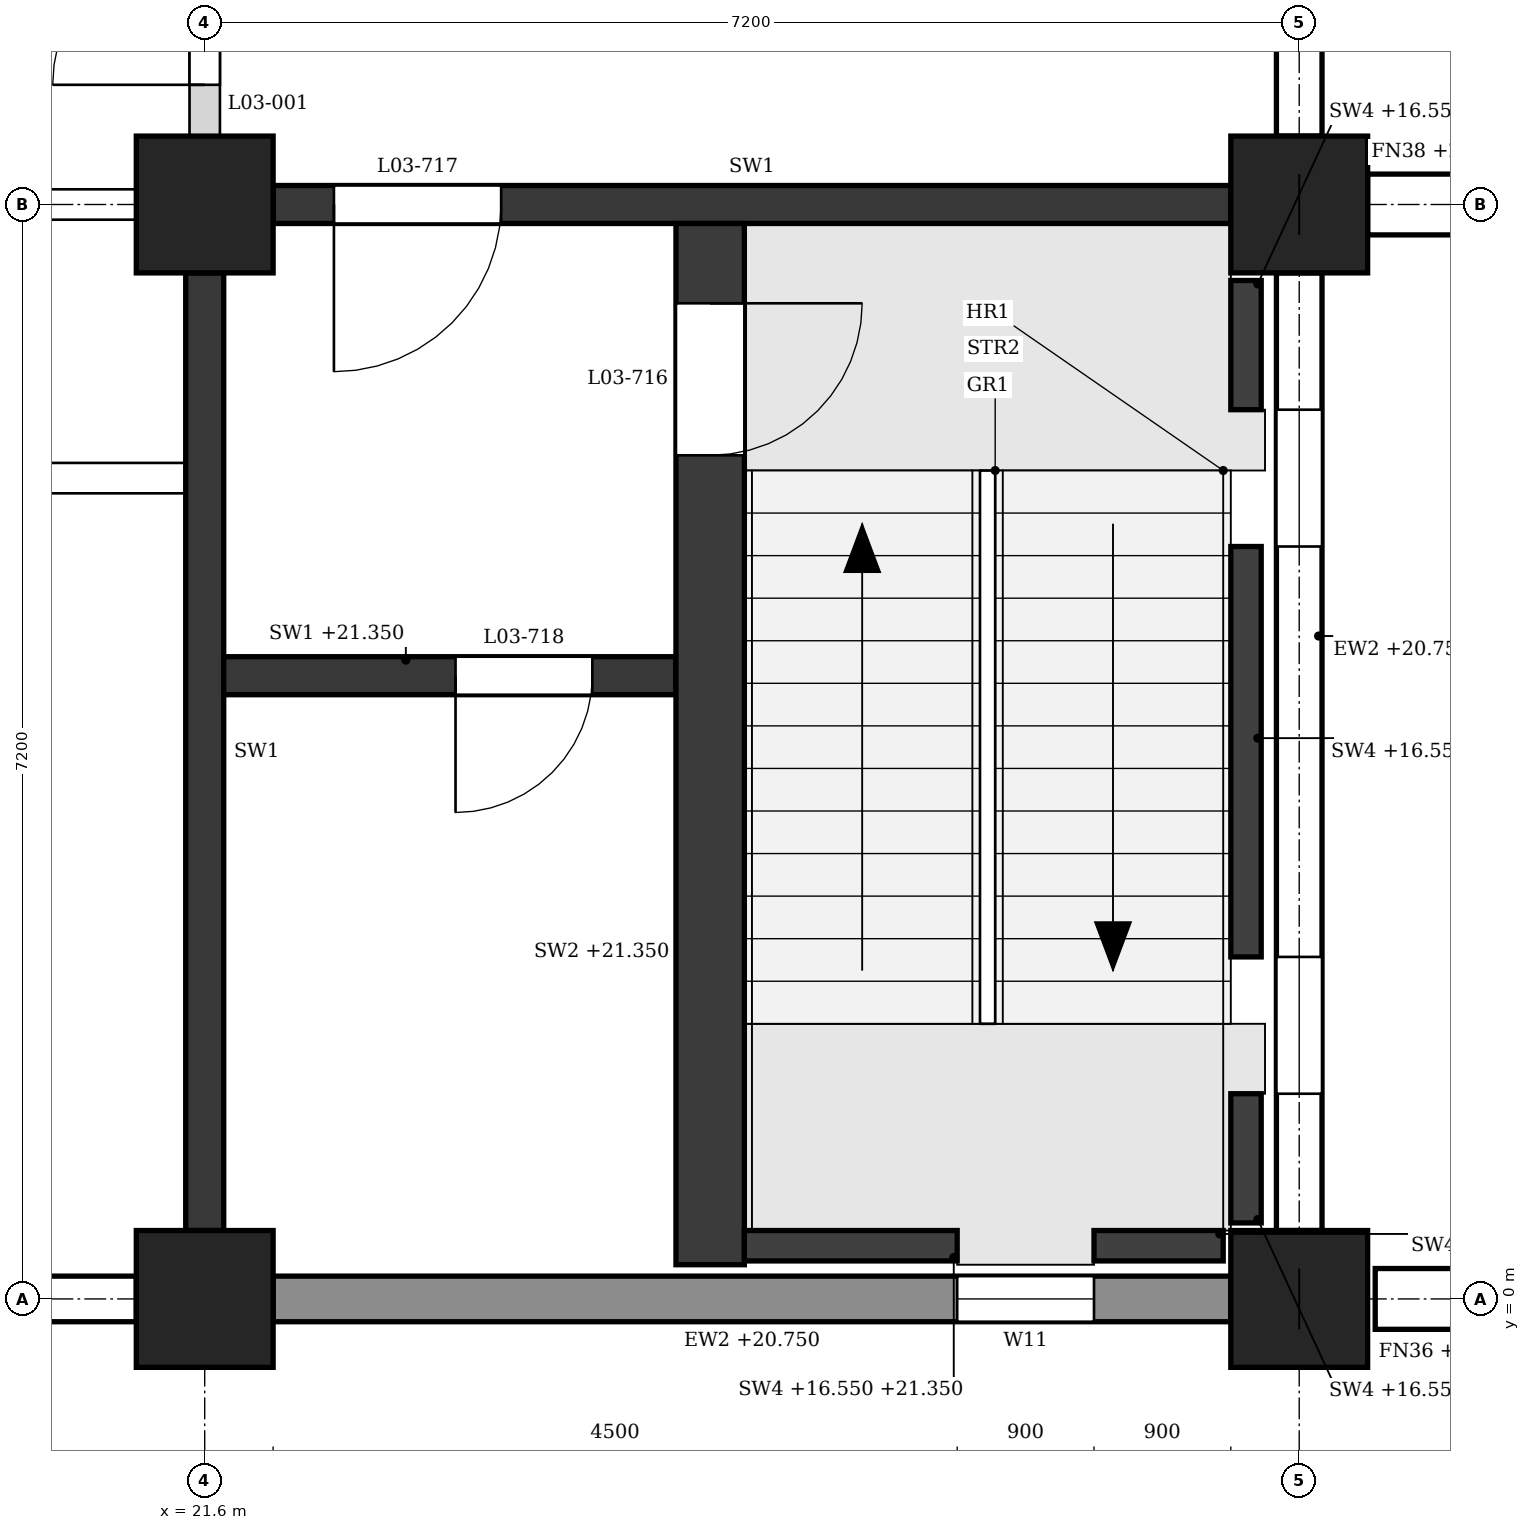
"""IFC4 building model, lengths in metres.
Left out: names, types, materials, properties, quantities, classifications, styles, units other than length and angle.
Written with IfcOpenShell. Run it as: python <this file> out.ifc"""

import sys

from ifc_helpers import new_model, si_unit, direction, frame, frame_2d, origin, origin_2d, place, context, subcontext, project, spatial, polyline, rectangle, outline, extrude, element, fill, save


model = new_model("IFC4")
c1 = context("Model", 3, precision=1e-05, world=origin(), true_north=direction((0.0, 1.0)))
c2 = subcontext(c1, "Body", "Model", "MODEL_VIEW")
j1 = project(units=[si_unit("LENGTHUNIT", "METRE"), si_unit("PLANEANGLEUNIT", "RADIAN")], contexts=[c1])
p1 = place(None, origin())
s1 = spatial("IfcSite", under=j1, at=p1, CompositionType="ELEMENT")
p2 = place(p1, origin())
s2 = spatial("IfcBuilding", under=s1, at=p2, CompositionType="ELEMENT")
p3 = place(p2, frame((0.0, 0.0, 16.8)))
s3 = spatial("IfcBuildingStorey", under=s2, at=p3, CompositionType="ELEMENT", Elevation=16.8)
for number, where, z_axis, x_axis in (
    (1, (21.6, 0.0, 0.0), (0.0, 0.0, 1.0), (1.0, 0.0, 0.0)),
    (2, (21.6, 7.2, 0.0), (0.0, 0.0, 1.0), (1.0, 0.0, 0.0)),
    (3, (28.8, 0.0, 0.0), (0.0, 0.0, 1.0), (1.0, 0.0, 0.0)),
    (4, (28.8, 7.2, 0.0), (0.0, 0.0, 1.0), (1.0, 0.0, 0.0)),
):
    element("IfcColumn", number, at=place(p3, frame(where, z_axis=z_axis, x_axis=x_axis)), inside=s3, PredefinedType="COLUMN", context=c2, shape_type="SweptSolid", body=[
        extrude(rectangle(XDim=0.9, YDim=0.9, at=origin_2d()), origin(), (0.0, 0.0, 1.0), 4.8),
    ])
p4 = place(p3, frame((14.85, 0.0, 0.0), z_axis=(0.0, 0.0, 1.0), x_axis=(1.0, 0.0, 0.0)))
e5 = element("IfcWall", 5, at=p4, inside=s3, PredefinedType="STANDARD", context=c2, shape_type="SweptSolid", body=[
    extrude(rectangle(XDim=6.3, YDim=0.3, at=frame_2d((3.15, 0.0))), origin(), (0.0, 0.0, 1.0), 3.95),
])
p5 = place(p4, frame((0.6, 0.0, 0.9)))
e6 = element("IfcOpeningElement", 6, at=p5, cuts=e5, PredefinedType="OPENING", context=c2, shape_type="SweptSolid", body=[
    extrude(outline(polyline([(0.0, 0.0), (1.5, 0.0), (1.5, 1.75), (0.75, 2.5), (0.0, 1.75), (0.0, 0.0)])), frame((0.0, 0.16, 0.0), z_axis=(0.0, -1.0, 0.0), x_axis=(1.0, 0.0, 0.0)), (0.0, 0.0, 1.0), 0.32),
])
p6 = place(p4, frame((4.2, 0.0, 0.9)))
e7 = element("IfcOpeningElement", 7, at=p6, cuts=e5, PredefinedType="OPENING", context=c2, shape_type="SweptSolid", body=[
    extrude(outline(polyline([(0.0, 0.0), (1.5, 0.0), (1.5, 1.75), (0.75, 2.5), (0.0, 1.75), (0.0, 0.0)])), frame((0.0, 0.16, 0.0), z_axis=(0.0, -1.0, 0.0), x_axis=(1.0, 0.0, 0.0)), (0.0, 0.0, 1.0), 0.32),
])
p7 = place(p3, frame((22.05, 0.0, 0.0), z_axis=(0.0, 0.0, 1.0), x_axis=(1.0, 0.0, 0.0)))
e8 = element("IfcWall", 8, at=p7, inside=s3, PredefinedType="STANDARD", context=c2, shape_type="SweptSolid", body=[
    extrude(rectangle(XDim=6.3, YDim=0.3, at=frame_2d((3.15, 0.0))), origin(), (0.0, 0.0, 1.0), 3.95),
])
p8 = place(p7, frame((4.5, 0.0, 0.9)))
e9 = element("IfcOpeningElement", 9, at=p8, cuts=e8, PredefinedType="OPENING", context=c2, shape_type="SweptSolid", body=[
    extrude(outline(polyline([(0.0, 0.0), (0.9, 0.0), (0.9, 2.05), (0.45, 2.5), (0.0, 2.05), (0.0, 0.0)])), frame((0.0, 0.16, 0.0), z_axis=(0.0, -1.0, 0.0), x_axis=(1.0, 0.0, 0.0)), (0.0, 0.0, 1.0), 0.32),
])
p9 = place(p3, frame((28.8, 0.45, 0.0), z_axis=(0.0, 0.0, 1.0), x_axis=(0.0, 1.0, 0.0)))
e10 = element("IfcWall", 10, at=p9, inside=s3, PredefinedType="STANDARD", context=c2, shape_type="SweptSolid", body=[
    extrude(rectangle(XDim=6.3, YDim=0.3, at=frame_2d((3.15, 0.0))), origin(), (0.0, 0.0, 1.0), 3.95),
])
p10 = place(p9, frame((0.9, 0.0, 0.9)))
e11 = element("IfcOpeningElement", 11, at=p10, cuts=e10, PredefinedType="OPENING", context=c2, shape_type="SweptSolid", body=[
    extrude(outline(polyline([(0.0, 0.0), (0.9, 0.0), (0.9, 2.05), (0.45, 2.5), (0.0, 2.05), (0.0, 0.0)])), frame((0.0, 0.16, 0.0), z_axis=(0.0, -1.0, 0.0), x_axis=(1.0, 0.0, 0.0)), (0.0, 0.0, 1.0), 0.32),
])
p11 = place(p9, frame((4.5, 0.0, 0.9)))
e12 = element("IfcOpeningElement", 12, at=p11, cuts=e10, PredefinedType="OPENING", context=c2, shape_type="SweptSolid", body=[
    extrude(outline(polyline([(0.0, 0.0), (0.9, 0.0), (0.9, 2.05), (0.45, 2.5), (0.0, 2.05), (0.0, 0.0)])), frame((0.0, 0.16, 0.0), z_axis=(0.0, -1.0, 0.0), x_axis=(1.0, 0.0, 0.0)), (0.0, 0.0, 1.0), 0.32),
])
p12 = place(p3, frame((28.8, 7.65, 0.0), z_axis=(0.0, 0.0, 1.0), x_axis=(0.0, 1.0, 0.0)))
e13 = element("IfcWall", 13, at=p12, inside=s3, PredefinedType="STANDARD", context=c2, shape_type="SweptSolid", body=[
    extrude(rectangle(XDim=6.3, YDim=0.3, at=frame_2d((3.15, 0.0))), origin(), (0.0, 0.0, 1.0), 3.95),
])
p13 = place(p12, frame((0.6, 0.0, 0.9)))
e14 = element("IfcOpeningElement", 14, at=p13, cuts=e13, PredefinedType="OPENING", context=c2, shape_type="SweptSolid", body=[
    extrude(outline(polyline([(0.0, 0.0), (1.5, 0.0), (1.5, 1.75), (0.75, 2.5), (0.0, 1.75), (0.0, 0.0)])), frame((0.0, 0.16, 0.0), z_axis=(0.0, -1.0, 0.0), x_axis=(1.0, 0.0, 0.0)), (0.0, 0.0, 1.0), 0.32),
])
for number, where, z_axis, x_axis in (
    (15, (29.3, 0.0, 0.0), (0.0, 0.0, 1.0), (1.0, 0.0, 0.0)),
    (16, (29.25, 7.2, 0.0), (0.0, 0.0, 1.0), (1.0, 0.0, 0.0)),
):
    element("IfcWall", number, at=place(p3, frame(where, z_axis=z_axis, x_axis=x_axis)), inside=s3, PredefinedType="POLYGONAL", context=c2, shape_type="SweptSolid", body=[
        extrude(outline(polyline([(0.6, 0.0), (0.6, 4.55), (0.0, 4.55), (0.0, 0.0), (0.6, 0.0)])), frame((0.0, 0.2, 0.0), z_axis=(0.0, -1.0, 0.0), x_axis=(1.0, 0.0, 0.0)), (0.0, 0.0, 1.0), 0.4),
    ])
p14 = place(p3, frame((22.05, 7.2, 0.0), z_axis=(0.0, 0.0, 1.0), x_axis=(1.0, 0.0, 0.0)))
e17 = element("IfcWall", 17, at=p14, inside=s3, PredefinedType="SHEAR", context=c2, shape_type="SweptSolid", body=[
    extrude(rectangle(XDim=6.3, YDim=0.25, at=frame_2d((3.15, 0.0))), origin(), (0.0, 0.0, 1.0), 3.8),
])
p15 = place(p14, frame((0.4, 0.0, 0.0)))
e18 = element("IfcOpeningElement", 18, at=p15, cuts=e17, PredefinedType="OPENING", context=c2, shape_type="SweptSolid", body=[
    extrude(rectangle(XDim=1.1, YDim=2.1, at=frame_2d((0.55, 1.05))), frame((0.0, 0.135, 0.0), z_axis=(0.0, -1.0, 0.0), x_axis=(1.0, 0.0, 0.0)), (0.0, 0.0, 1.0), 0.27),
])
p16 = place(p3, frame((21.6, 0.45, 0.0), z_axis=(0.0, 0.0, 1.0), x_axis=(0.0, 1.0, 0.0)))
e19 = element("IfcWall", 19, at=p16, inside=s3, PredefinedType="SHEAR", context=c2, shape_type="SweptSolid", body=[
    extrude(rectangle(XDim=6.3, YDim=0.25, at=frame_2d((3.15, 0.0))), origin(), (0.0, 0.0, 1.0), 3.8),
])
p17 = place(p3, frame((28.45, 0.5, -0.25), z_axis=(0.0, 0.0, 1.0), x_axis=(0.0, 1.0, 0.0)))
e20 = element("IfcWall", 20, at=p17, inside=s3, PredefinedType="SHEAR", context=c2, shape_type="SweptSolid", body=[
    extrude(rectangle(XDim=0.85, YDim=0.2, at=frame_2d((0.425, 0.0))), origin(), (0.0, 0.0, 1.0), 4.8),
])
p18 = place(p3, frame((28.45, 2.25, -0.25), z_axis=(0.0, 0.0, 1.0), x_axis=(0.0, 1.0, 0.0)))
e21 = element("IfcWall", 21, at=p18, inside=s3, PredefinedType="SHEAR", context=c2, shape_type="SweptSolid", body=[
    extrude(rectangle(XDim=2.7, YDim=0.2, at=frame_2d((1.35, 0.0))), origin(), (0.0, 0.0, 1.0), 4.8),
])
p19 = place(p3, frame((28.45, 5.85, -0.25), z_axis=(0.0, 0.0, 1.0), x_axis=(0.0, 1.0, 0.0)))
e22 = element("IfcWall", 22, at=p19, inside=s3, PredefinedType="SHEAR", context=c2, shape_type="SweptSolid", body=[
    extrude(rectangle(XDim=0.85, YDim=0.2, at=frame_2d((0.425, 0.0))), origin(), (0.0, 0.0, 1.0), 4.8),
])
p20 = place(p3, frame((25.15, 0.35, -0.25), z_axis=(0.0, 0.0, 1.0), x_axis=(1.0, 0.0, 0.0)))
e23 = element("IfcWall", 23, at=p20, inside=s3, PredefinedType="SHEAR", context=c2, shape_type="SweptSolid", body=[
    extrude(rectangle(XDim=1.4, YDim=0.2, at=frame_2d((0.7, 0.0))), origin(), (0.0, 0.0, 1.0), 4.8),
])
p21 = place(p3, frame((27.45, 0.35, -0.25), z_axis=(0.0, 0.0, 1.0), x_axis=(1.0, 0.0, 0.0)))
e24 = element("IfcWall", 24, at=p21, inside=s3, PredefinedType="SHEAR", context=c2, shape_type="SweptSolid", body=[
    extrude(rectangle(XDim=0.85, YDim=0.2, at=frame_2d((0.425, 0.0))), origin(), (0.0, 0.0, 1.0), 4.8),
])
p22 = place(p3, frame((24.925, 0.225, 0.0), z_axis=(0.0, 0.0, 1.0), x_axis=(0.0, 1.0, 0.0)))
e25 = element("IfcWall", 25, at=p22, inside=s3, PredefinedType="SHEAR", context=c2, shape_type="SweptSolid", body=[
    extrude(rectangle(XDim=6.85, YDim=0.45, at=frame_2d((3.425, 0.0))), origin(), (0.0, 0.0, 1.0), 4.55),
])
p23 = place(p22, frame((5.325, 0.0, 0.0)))
e26 = element("IfcOpeningElement", 26, at=p23, cuts=e25, PredefinedType="OPENING", context=c2, shape_type="SweptSolid", body=[
    extrude(rectangle(XDim=1.0, YDim=2.1, at=frame_2d((0.5, 1.05))), frame((0.0, 0.235, 0.0), z_axis=(0.0, -1.0, 0.0), x_axis=(1.0, 0.0, 0.0)), (0.0, 0.0, 1.0), 0.47),
])
p24 = place(p3, frame((21.725, 4.1, 0.0), z_axis=(0.0, 0.0, 1.0), x_axis=(1.0, 0.0, 0.0)))
e27 = element("IfcWall", 27, at=p24, inside=s3, PredefinedType="SHEAR", context=c2, shape_type="SweptSolid", body=[
    extrude(rectangle(XDim=2.975, YDim=0.25, at=frame_2d((1.487, 0.0))), origin(), (0.0, 0.0, 1.0), 4.55),
])
p25 = place(p24, frame((1.525, 0.0, 0.0)))
e28 = element("IfcOpeningElement", 28, at=p25, cuts=e27, PredefinedType="OPENING", context=c2, shape_type="SweptSolid", body=[
    extrude(rectangle(XDim=0.9, YDim=2.1, at=frame_2d((0.45, 1.05))), frame((0.0, 0.135, 0.0), z_axis=(0.0, -1.0, 0.0), x_axis=(1.0, 0.0, 0.0)), (0.0, 0.0, 1.0), 0.27),
])
p26 = place(p3, frame((7.325, 5.4, 0.0), z_axis=(0.0, 0.0, 1.0), x_axis=(1.0, 0.0, 0.0)))
e29 = element("IfcWall", 29, at=p26, inside=s3, PredefinedType="PARTITIONING", context=c2, shape_type="SweptSolid", body=[
    extrude(outline(polyline([(0.0, 0.0), (14.15, 0.0), (14.15, 3.8), (14.025, 3.8), (14.025, 4.55), (7.325, 4.55), (7.325, 3.8), (6.825, 3.8), (6.825, 4.55), (0.125, 4.55), (0.125, 3.8), (0.0, 3.8), (0.0, 0.0)])), frame((0.0, 0.1, 0.0), z_axis=(0.0, -1.0, 0.0), x_axis=(1.0, 0.0, 0.0)), (0.0, 0.0, 1.0), 0.2),
])
p27 = place(p26, frame((1.238, 0.0, 0.0)))
e30 = element("IfcOpeningElement", 30, at=p27, cuts=e29, PredefinedType="OPENING", context=c2, shape_type="SweptSolid", body=[
    extrude(rectangle(XDim=1.0, YDim=2.1, at=frame_2d((0.5, 1.05))), frame((0.0, 0.11, 0.0), z_axis=(0.0, -1.0, 0.0), x_axis=(1.0, 0.0, 0.0)), (0.0, 0.0, 1.0), 0.22),
])
p28 = place(p26, frame((4.775, 0.0, 0.0)))
e31 = element("IfcOpeningElement", 31, at=p28, cuts=e29, PredefinedType="OPENING", context=c2, shape_type="SweptSolid", body=[
    extrude(rectangle(XDim=1.0, YDim=2.1, at=frame_2d((0.5, 1.05))), frame((0.0, 0.11, 0.0), z_axis=(0.0, -1.0, 0.0), x_axis=(1.0, 0.0, 0.0)), (0.0, 0.0, 1.0), 0.22),
])
p29 = place(p26, frame((8.375, 0.0, 0.0)))
e32 = element("IfcOpeningElement", 32, at=p29, cuts=e29, PredefinedType="OPENING", context=c2, shape_type="SweptSolid", body=[
    extrude(rectangle(XDim=1.0, YDim=2.1, at=frame_2d((0.5, 1.05))), frame((0.0, 0.11, 0.0), z_axis=(0.0, -1.0, 0.0), x_axis=(1.0, 0.0, 0.0)), (0.0, 0.0, 1.0), 0.22),
])
p30 = place(p26, frame((11.913, 0.0, 0.0)))
e33 = element("IfcOpeningElement", 33, at=p30, cuts=e29, PredefinedType="OPENING", context=c2, shape_type="SweptSolid", body=[
    extrude(rectangle(XDim=1.0, YDim=2.1, at=frame_2d((0.5, 1.05))), frame((0.0, 0.11, 0.0), z_axis=(0.0, -1.0, 0.0), x_axis=(1.0, 0.0, 0.0)), (0.0, 0.0, 1.0), 0.22),
])
p31 = place(p3, frame((14.85, 7.2, 0.0), z_axis=(0.0, 0.0, 1.0), x_axis=(1.0, 0.0, 0.0)))
e34 = element("IfcWall", 34, at=p31, inside=s3, PredefinedType="PARTITIONING", context=c2, shape_type="SweptSolid", body=[
    extrude(rectangle(XDim=6.3, YDim=0.2, at=frame_2d((3.15, 0.0))), origin(), (0.0, 0.0, 1.0), 3.8),
])
p32 = place(p31, frame((4.225, 0.0, 0.0)))
e35 = element("IfcOpeningElement", 35, at=p32, cuts=e34, PredefinedType="OPENING", context=c2, shape_type="SweptSolid", body=[
    extrude(rectangle(XDim=1.0, YDim=2.1, at=frame_2d((0.5, 1.05))), frame((0.0, 0.11, 0.0), z_axis=(0.0, -1.0, 0.0), x_axis=(1.0, 0.0, 0.0)), (0.0, 0.0, 1.0), 0.22),
])
p33 = place(p3, frame((21.6, 7.65, 0.0), z_axis=(0.0, 0.0, 1.0), x_axis=(0.0, 1.0, 0.0)))
e36 = element("IfcWall", 36, at=p33, inside=s3, PredefinedType="PARTITIONING", context=c2, shape_type="SweptSolid", body=[
    extrude(rectangle(XDim=2.675, YDim=0.2, at=frame_2d((1.337, 0.0))), origin(), (0.0, 0.0, 1.0), 3.8),
])
p34 = place(p33, frame((0.337, 0.0, 0.0)))
e37 = element("IfcOpeningElement", 37, at=p34, cuts=e36, PredefinedType="OPENING", context=c2, shape_type="SweptSolid", body=[
    extrude(rectangle(XDim=2.0, YDim=2.4, at=frame_2d((1.0, 1.2))), frame((0.0, 0.11, 0.0), z_axis=(0.0, -1.0, 0.0), x_axis=(1.0, 0.0, 0.0)), (0.0, 0.0, 1.0), 0.22),
])
p35 = place(p10, origin())
e38 = element("IfcWindow", 38, at=p35, inside=s3, PartitioningType="SINGLE_PANEL", PredefinedType="WINDOW", context=c2, shape_type="SweptSolid", body=[
    extrude(outline(polyline([(0.0, 0.0), (0.9, 0.0), (0.9, 2.05), (0.45, 2.5), (0.0, 2.05), (0.0, 0.0)])), frame((0.0, 0.03, 0.0), z_axis=(0.0, -1.0, 0.0), x_axis=(1.0, 0.0, 0.0)), (0.0, 0.0, 1.0), 0.06),
])
fill(e11, e38)
p36 = place(p11, origin())
e39 = element("IfcWindow", 39, at=p36, inside=s3, PartitioningType="SINGLE_PANEL", PredefinedType="WINDOW", context=c2, shape_type="SweptSolid", body=[
    extrude(outline(polyline([(0.0, 0.0), (0.9, 0.0), (0.9, 2.05), (0.45, 2.5), (0.0, 2.05), (0.0, 0.0)])), frame((0.0, 0.03, 0.0), z_axis=(0.0, -1.0, 0.0), x_axis=(1.0, 0.0, 0.0)), (0.0, 0.0, 1.0), 0.06),
])
fill(e12, e39)
p37 = place(p8, origin())
e40 = element("IfcWindow", 40, at=p37, inside=s3, PartitioningType="SINGLE_PANEL", PredefinedType="WINDOW", context=c2, shape_type="SweptSolid", body=[
    extrude(outline(polyline([(0.0, 0.0), (0.9, 0.0), (0.9, 2.05), (0.45, 2.5), (0.0, 2.05), (0.0, 0.0)])), frame((0.0, 0.03, 0.0), z_axis=(0.0, -1.0, 0.0), x_axis=(1.0, 0.0, 0.0)), (0.0, 0.0, 1.0), 0.06),
])
fill(e9, e40)
p38 = place(p23, frame((1.0, 0.0, 0.0), z_axis=(0.0, 0.0, 1.0), x_axis=(-1.0, 0.0, 0.0)))
e41 = element("IfcDoor", 41, at=p38, inside=s3, OperationType="SINGLE_SWING_LEFT", PredefinedType="DOOR", context=c2, shape_type="SweptSolid", body=[
    extrude(rectangle(XDim=1.0, YDim=2.1, at=frame_2d((0.5, 1.05))), frame((0.0, 0.025, 0.0), z_axis=(0.0, -1.0, 0.0), x_axis=(1.0, 0.0, 0.0)), (0.0, 0.0, 1.0), 0.05),
])
fill(e26, e41)
p39 = place(p15, frame((1.1, 0.0, 0.0), z_axis=(0.0, 0.0, 1.0), x_axis=(-1.0, 0.0, 0.0)))
e42 = element("IfcDoor", 42, at=p39, inside=s3, OperationType="SINGLE_SWING_RIGHT", PredefinedType="DOOR", context=c2, shape_type="SweptSolid", body=[
    extrude(rectangle(XDim=1.1, YDim=2.1, at=frame_2d((0.55, 1.05))), frame((0.0, 0.025, 0.0), z_axis=(0.0, -1.0, 0.0), x_axis=(1.0, 0.0, 0.0)), (0.0, 0.0, 1.0), 0.05),
])
fill(e18, e42)
p40 = place(p25, frame((0.9, 0.0, 0.0), z_axis=(0.0, 0.0, 1.0), x_axis=(-1.0, 0.0, 0.0)))
e43 = element("IfcDoor", 43, at=p40, inside=s3, OperationType="SINGLE_SWING_RIGHT", PredefinedType="DOOR", context=c2, shape_type="SweptSolid", body=[
    extrude(rectangle(XDim=0.9, YDim=2.1, at=frame_2d((0.45, 1.05))), frame((0.0, 0.025, 0.0), z_axis=(0.0, -1.0, 0.0), x_axis=(1.0, 0.0, 0.0)), (0.0, 0.0, 1.0), 0.05),
])
fill(e28, e43)
p41 = place(p34, origin())
e44 = element("IfcDoor", 44, at=p41, inside=s3, OperationType="DOUBLE_DOOR_SINGLE_SWING", PredefinedType="DOOR", context=c2, shape_type="SweptSolid", body=[
    extrude(rectangle(XDim=2.0, YDim=2.4, at=frame_2d((1.0, 1.2))), frame((0.0, 0.025, 0.0), z_axis=(0.0, -1.0, 0.0), x_axis=(1.0, 0.0, 0.0)), (0.0, 0.0, 1.0), 0.05),
])
fill(e37, e44)
save(model, sys.argv[1])
